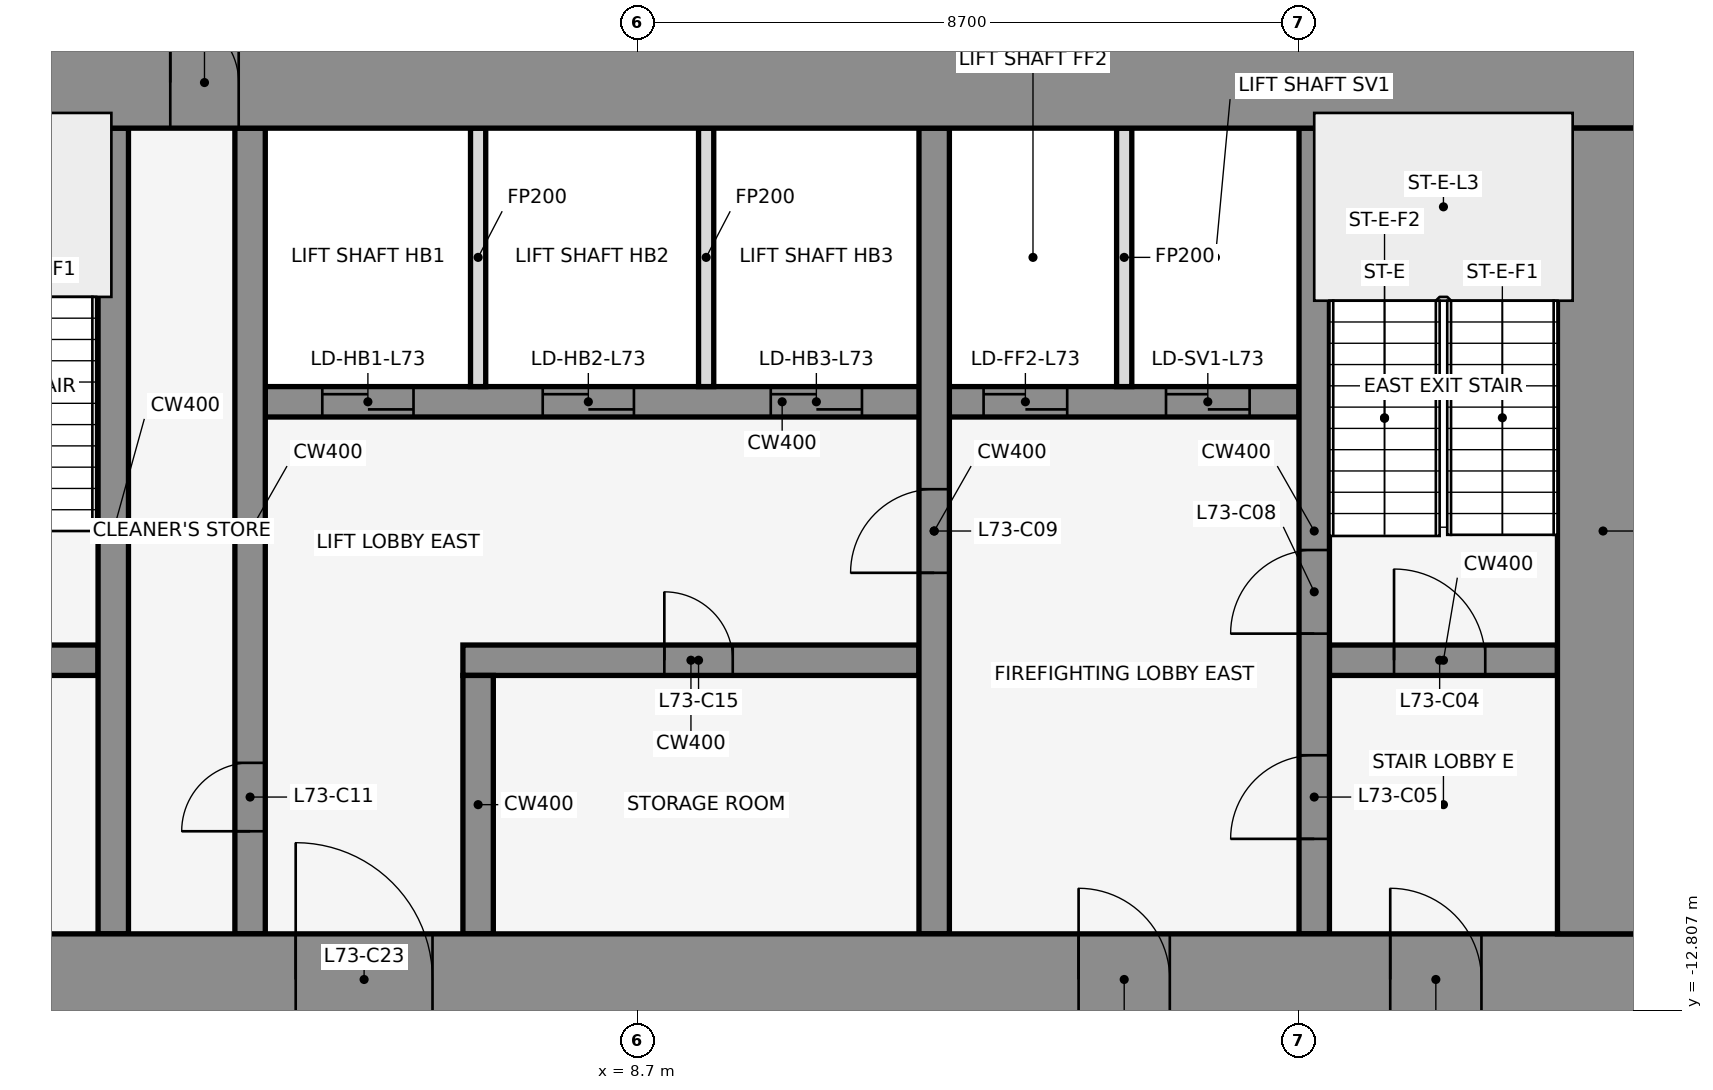
"""IFC4 building model, lengths in metres.
Left out: names, types, materials, properties, quantities, classifications, styles, units other than length and angle.
Written with IfcOpenShell. Run it as: python <this file> out.ifc"""

import sys

from ifc_helpers import new_model, si_unit, direction, frame, frame_2d, origin, place, context, subcontext, project, spatial, rectangle, extrude, element, fill, save


model = new_model("IFC4")
c1 = context("Model", 3, precision=1e-05, world=origin(), true_north=direction((0.0, 1.0)))
c2 = subcontext(c1, "Body", "Model", "MODEL_VIEW")
j1 = project(units=[si_unit("LENGTHUNIT", "METRE"), si_unit("PLANEANGLEUNIT", "RADIAN")], contexts=[c1])
p1 = place(None, origin())
s1 = spatial("IfcSite", under=j1, at=p1, CompositionType="ELEMENT")
p2 = place(p1, origin())
s2 = spatial("IfcBuilding", under=s1, at=p2, CompositionType="ELEMENT")
p3 = place(p2, frame((0.0, 0.0, 324.5)))
s3 = spatial("IfcBuildingStorey", under=s2, at=p3, CompositionType="ELEMENT", Elevation=324.5)
for number, where, z_axis, x_axis in (
    (1, (16.432, -0.105, 0.0), (0.0, 0.0, 1.0), (-0.84, 0.543, 0.0)),
    (2, (1.901, 1.08, 0.0), (0.0, 0.0, 1.0), (-0.84, -0.543, 0.0)),
):
    element("IfcWall", number, at=place(p3, frame(where, z_axis=z_axis, x_axis=x_axis)), inside=s3, PredefinedType="STANDARD", context=c2, shape_type="SweptSolid", body=[
        extrude(rectangle(XDim=2.183, YDim=0.25, at=frame_2d((1.091, 0.0))), origin(), (0.0, 0.0, 1.0), 4.35),
    ])
p4 = place(p3, frame((-1.6, -8.2, 0.0), z_axis=(0.0, 0.0, 1.0), x_axis=(1.0, 0.0, 0.0)))
e3 = element("IfcWall", 3, at=p4, inside=s3, PredefinedType="SHEAR", context=c2, shape_type="SweptSolid", body=[
    extrude(rectangle(XDim=3.2, YDim=0.4, at=frame_2d((1.6, 0.0))), origin(), (0.0, 0.0, 1.0), 4.5),
])
p5 = place(p4, frame((1.05, 0.0, 0.0)))
e4 = element("IfcOpeningElement", 4, at=p5, cuts=e3, PredefinedType="OPENING", context=c2, shape_type="SweptSolid", body=[
    extrude(rectangle(XDim=1.2, YDim=2.1, at=frame_2d((0.6, 1.05))), frame((0.0, 0.212, 0.0), z_axis=(0.0, -1.0, 0.0), x_axis=(1.0, 0.0, 0.0)), (0.0, 0.0, 1.0), 0.424),
])
p6 = place(p3, frame((6.4, -8.2, 0.0), z_axis=(0.0, 0.0, 1.0), x_axis=(1.0, 0.0, 0.0)))
e5 = element("IfcWall", 5, at=p6, inside=s3, PredefinedType="SHEAR", context=c2, shape_type="SweptSolid", body=[
    extrude(rectangle(XDim=6.0, YDim=0.4, at=frame_2d((3.0, 0.0))), origin(), (0.0, 0.0, 1.0), 4.5),
])
p7 = place(p6, frame((2.65, 0.0, 0.0)))
e6 = element("IfcOpeningElement", 6, at=p7, cuts=e5, PredefinedType="OPENING", context=c2, shape_type="SweptSolid", body=[
    extrude(rectangle(XDim=0.9, YDim=2.1, at=frame_2d((0.45, 1.05))), frame((0.0, 0.212, 0.0), z_axis=(0.0, -1.0, 0.0), x_axis=(1.0, 0.0, 0.0)), (0.0, 0.0, 1.0), 0.424),
])
p8 = place(p3, frame((17.8, -8.2, 0.0), z_axis=(0.0, 0.0, 1.0), x_axis=(1.0, 0.0, 0.0)))
e7 = element("IfcWall", 7, at=p8, inside=s3, PredefinedType="SHEAR", context=c2, shape_type="SweptSolid", body=[
    extrude(rectangle(XDim=3.0, YDim=0.4, at=frame_2d((1.5, 0.0))), origin(), (0.0, 0.0, 1.0), 4.5),
])
p9 = place(p8, frame((0.85, 0.0, 0.0)))
e8 = element("IfcOpeningElement", 8, at=p9, cuts=e7, PredefinedType="OPENING", context=c2, shape_type="SweptSolid", body=[
    extrude(rectangle(XDim=1.2, YDim=2.1, at=frame_2d((0.6, 1.05))), frame((0.0, 0.212, 0.0), z_axis=(0.0, -1.0, 0.0), x_axis=(1.0, 0.0, 0.0)), (0.0, 0.0, 1.0), 0.424),
])
p10 = place(p3, frame((3.8, -4.8, 0.0), z_axis=(0.0, 0.0, 1.0), x_axis=(1.0, 0.0, 0.0)))
e9 = element("IfcWall", 9, at=p10, inside=s3, PredefinedType="SHEAR", context=c2, shape_type="SweptSolid", body=[
    extrude(rectangle(XDim=13.6, YDim=0.4, at=frame_2d((6.8, 0.0))), origin(), (0.0, 0.0, 1.0), 4.5),
])
p11 = place(p10, frame((0.75, 0.0, 0.0)))
e10 = element("IfcOpeningElement", 10, at=p11, cuts=e9, PredefinedType="OPENING", context=c2, shape_type="SweptSolid", body=[
    extrude(rectangle(XDim=1.2, YDim=2.1, at=frame_2d((0.6, 1.05))), frame((0.0, 0.212, 0.0), z_axis=(0.0, -1.0, 0.0), x_axis=(1.0, 0.0, 0.0)), (0.0, 0.0, 1.0), 0.424),
])
p12 = place(p10, frame((3.65, 0.0, 0.0)))
e11 = element("IfcOpeningElement", 11, at=p12, cuts=e9, PredefinedType="OPENING", context=c2, shape_type="SweptSolid", body=[
    extrude(rectangle(XDim=1.2, YDim=2.1, at=frame_2d((0.6, 1.05))), frame((0.0, 0.212, 0.0), z_axis=(0.0, -1.0, 0.0), x_axis=(1.0, 0.0, 0.0)), (0.0, 0.0, 1.0), 0.424),
])
p13 = place(p10, frame((6.65, 0.0, 0.0)))
e12 = element("IfcOpeningElement", 12, at=p13, cuts=e9, PredefinedType="OPENING", context=c2, shape_type="SweptSolid", body=[
    extrude(rectangle(XDim=1.2, YDim=2.1, at=frame_2d((0.6, 1.05))), frame((0.0, 0.212, 0.0), z_axis=(0.0, -1.0, 0.0), x_axis=(1.0, 0.0, 0.0)), (0.0, 0.0, 1.0), 0.424),
])
p14 = place(p10, frame((9.45, 0.0, 0.0)))
e13 = element("IfcOpeningElement", 13, at=p14, cuts=e9, PredefinedType="OPENING", context=c2, shape_type="SweptSolid", body=[
    extrude(rectangle(XDim=1.1, YDim=2.1, at=frame_2d((0.55, 1.05))), frame((0.0, 0.212, 0.0), z_axis=(0.0, -1.0, 0.0), x_axis=(1.0, 0.0, 0.0)), (0.0, 0.0, 1.0), 0.424),
])
p15 = place(p10, frame((11.85, 0.0, 0.0)))
e14 = element("IfcOpeningElement", 14, at=p15, cuts=e9, PredefinedType="OPENING", context=c2, shape_type="SweptSolid", body=[
    extrude(rectangle(XDim=1.1, YDim=2.1, at=frame_2d((0.55, 1.05))), frame((0.0, 0.212, 0.0), z_axis=(0.0, -1.0, 0.0), x_axis=(1.0, 0.0, 0.0)), (0.0, 0.0, 1.0), 0.424),
])
p16 = place(p3, frame((1.8, -11.8, 0.0), z_axis=(0.0, 0.0, 1.0), x_axis=(0.0, 1.0, 0.0)))
e15 = element("IfcWall", 15, at=p16, inside=s3, PredefinedType="SHEAR", context=c2, shape_type="SweptSolid", body=[
    extrude(rectangle(XDim=10.6, YDim=0.4, at=frame_2d((5.3, 0.0))), origin(), (0.0, 0.0, 1.0), 4.5),
])
p17 = place(p3, frame((3.6, -11.8, 0.0), z_axis=(0.0, 0.0, 1.0), x_axis=(0.0, 1.0, 0.0)))
e16 = element("IfcWall", 16, at=p17, inside=s3, PredefinedType="SHEAR", context=c2, shape_type="SweptSolid", body=[
    extrude(rectangle(XDim=10.6, YDim=0.4, at=frame_2d((5.3, 0.0))), origin(), (0.0, 0.0, 1.0), 4.5),
])
p18 = place(p17, frame((1.35, 0.0, 0.0)))
e17 = element("IfcOpeningElement", 17, at=p18, cuts=e16, PredefinedType="OPENING", context=c2, shape_type="SweptSolid", body=[
    extrude(rectangle(XDim=0.9, YDim=2.1, at=frame_2d((0.45, 1.05))), frame((0.0, 0.212, 0.0), z_axis=(0.0, -1.0, 0.0), x_axis=(1.0, 0.0, 0.0)), (0.0, 0.0, 1.0), 0.424),
])
p19 = place(p3, frame((6.6, -11.8, 0.0), z_axis=(0.0, 0.0, 1.0), x_axis=(0.0, 1.0, 0.0)))
e18 = element("IfcWall", 18, at=p19, inside=s3, PredefinedType="SHEAR", context=c2, shape_type="SweptSolid", body=[
    extrude(rectangle(XDim=3.4, YDim=0.4, at=frame_2d((1.7, 0.0))), origin(), (0.0, 0.0, 1.0), 4.5),
])
for number, where, z_axis, x_axis in (
    (19, (6.6, -4.6, 0.0), (0.0, 0.0, 1.0), (0.0, 1.0, 0.0)),
    (20, (9.6, -4.6, 0.0), (0.0, 0.0, 1.0), (0.0, 1.0, 0.0)),
):
    element("IfcWall", number, at=place(p3, frame(where, z_axis=z_axis, x_axis=x_axis)), inside=s3, PredefinedType="PARTITIONING", context=c2, shape_type="SweptSolid", body=[
        extrude(rectangle(XDim=3.4, YDim=0.2, at=frame_2d((1.7, 0.0))), origin(), (0.0, 0.0, 1.0), 3.418),
    ])
p20 = place(p3, frame((12.6, -11.8, 0.0), z_axis=(0.0, 0.0, 1.0), x_axis=(0.0, 1.0, 0.0)))
e21 = element("IfcWall", 21, at=p20, inside=s3, PredefinedType="SHEAR", context=c2, shape_type="SweptSolid", body=[
    extrude(rectangle(XDim=10.6, YDim=0.4, at=frame_2d((5.3, 0.0))), origin(), (0.0, 0.0, 1.0), 4.5),
])
p21 = place(p20, frame((4.75, 0.0, 0.0)))
e22 = element("IfcOpeningElement", 22, at=p21, cuts=e21, PredefinedType="OPENING", context=c2, shape_type="SweptSolid", body=[
    extrude(rectangle(XDim=1.1, YDim=2.1, at=frame_2d((0.55, 1.05))), frame((0.0, 0.212, 0.0), z_axis=(0.0, -1.0, 0.0), x_axis=(1.0, 0.0, 0.0)), (0.0, 0.0, 1.0), 0.424),
])
p22 = place(p3, frame((15.1, -4.6, 0.0), z_axis=(0.0, 0.0, 1.0), x_axis=(0.0, 1.0, 0.0)))
e23 = element("IfcWall", 23, at=p22, inside=s3, PredefinedType="PARTITIONING", context=c2, shape_type="SweptSolid", body=[
    extrude(rectangle(XDim=3.4, YDim=0.2, at=frame_2d((1.7, 0.0))), origin(), (0.0, 0.0, 1.0), 3.418),
])
p23 = place(p3, frame((17.6, -11.8, 0.0), z_axis=(0.0, 0.0, 1.0), x_axis=(0.0, 1.0, 0.0)))
e24 = element("IfcWall", 24, at=p23, inside=s3, PredefinedType="SHEAR", context=c2, shape_type="SweptSolid", body=[
    extrude(rectangle(XDim=10.6, YDim=0.4, at=frame_2d((5.3, 0.0))), origin(), (0.0, 0.0, 1.0), 4.5),
])
p24 = place(p23, frame((1.25, 0.0, 0.0)))
e25 = element("IfcOpeningElement", 25, at=p24, cuts=e24, PredefinedType="OPENING", context=c2, shape_type="SweptSolid", body=[
    extrude(rectangle(XDim=1.1, YDim=2.1, at=frame_2d((0.55, 1.05))), frame((0.0, 0.212, 0.0), z_axis=(0.0, -1.0, 0.0), x_axis=(1.0, 0.0, 0.0)), (0.0, 0.0, 1.0), 0.424),
])
p25 = place(p23, frame((3.95, 0.0, 0.0)))
e26 = element("IfcOpeningElement", 26, at=p25, cuts=e24, PredefinedType="OPENING", context=c2, shape_type="SweptSolid", body=[
    extrude(rectangle(XDim=1.1, YDim=2.1, at=frame_2d((0.55, 1.05))), frame((0.0, 0.212, 0.0), z_axis=(0.0, -1.0, 0.0), x_axis=(1.0, 0.0, 0.0)), (0.0, 0.0, 1.0), 0.424),
])
p26 = place(p3, frame((-22.0, -0.6, 0.0), z_axis=(0.0, 0.0, 1.0), x_axis=(1.0, 0.0, 0.0)))
e27 = element("IfcWall", 27, at=p26, inside=s3, PredefinedType="SHEAR", context=c2, shape_type="SweptSolid", body=[
    extrude(rectangle(XDim=44.0, YDim=1.2, at=frame_2d((22.0, 0.0))), origin(), (0.0, 0.0, 1.0), 4.5),
])
p27 = place(p26, frame((18.55, 0.0, 0.0)))
e28 = element("IfcOpeningElement", 28, at=p27, cuts=e27, PredefinedType="OPENING", context=c2, shape_type="SweptSolid", body=[
    extrude(rectangle(XDim=0.9, YDim=2.1, at=frame_2d((0.45, 1.05))), frame((0.0, 0.612, 0.0), z_axis=(0.0, -1.0, 0.0), x_axis=(1.0, 0.0, 0.0)), (0.0, 0.0, 1.0), 1.224),
])
p28 = place(p26, frame((24.55, 0.0, 0.0)))
e29 = element("IfcOpeningElement", 29, at=p28, cuts=e27, PredefinedType="OPENING", context=c2, shape_type="SweptSolid", body=[
    extrude(rectangle(XDim=0.9, YDim=2.1, at=frame_2d((0.45, 1.05))), frame((0.0, 0.612, 0.0), z_axis=(0.0, -1.0, 0.0), x_axis=(1.0, 0.0, 0.0)), (0.0, 0.0, 1.0), 1.224),
])
p29 = place(p3, frame((-22.0, -12.4, 0.0), z_axis=(0.0, 0.0, 1.0), x_axis=(1.0, 0.0, 0.0)))
e30 = element("IfcWall", 30, at=p29, inside=s3, PredefinedType="SHEAR", context=c2, shape_type="SweptSolid", body=[
    extrude(rectangle(XDim=44.0, YDim=1.2, at=frame_2d((22.0, 0.0))), origin(), (0.0, 0.0, 1.0), 4.5),
])
p30 = place(p29, frame((2.2, 0.0, 0.0)))
e31 = element("IfcOpeningElement", 31, at=p30, cuts=e30, PredefinedType="OPENING", context=c2, shape_type="SweptSolid", body=[
    extrude(rectangle(XDim=1.2, YDim=2.1, at=frame_2d((0.6, 1.05))), frame((0.0, 0.612, 0.0), z_axis=(0.0, -1.0, 0.0), x_axis=(1.0, 0.0, 0.0)), (0.0, 0.0, 1.0), 1.224),
])
p31 = place(p29, frame((21.4, 0.0, 0.0)))
e32 = element("IfcOpeningElement", 32, at=p31, cuts=e30, PredefinedType="OPENING", context=c2, shape_type="SweptSolid", body=[
    extrude(rectangle(XDim=1.2, YDim=2.1, at=frame_2d((0.6, 1.05))), frame((0.0, 0.612, 0.0), z_axis=(0.0, -1.0, 0.0), x_axis=(1.0, 0.0, 0.0)), (0.0, 0.0, 1.0), 1.224),
])
p32 = place(p29, frame((40.6, 0.0, 0.0)))
e33 = element("IfcOpeningElement", 33, at=p32, cuts=e30, PredefinedType="OPENING", context=c2, shape_type="SweptSolid", body=[
    extrude(rectangle(XDim=1.2, YDim=2.1, at=frame_2d((0.6, 1.05))), frame((0.0, 0.612, 0.0), z_axis=(0.0, -1.0, 0.0), x_axis=(1.0, 0.0, 0.0)), (0.0, 0.0, 1.0), 1.224),
])
p33 = place(p29, frame((16.0, 0.0, 0.0)))
e34 = element("IfcOpeningElement", 34, at=p33, cuts=e30, PredefinedType="OPENING", context=c2, shape_type="SweptSolid", body=[
    extrude(rectangle(XDim=1.8, YDim=2.1, at=frame_2d((0.9, 1.05))), frame((0.0, 0.612, 0.0), z_axis=(0.0, -1.0, 0.0), x_axis=(1.0, 0.0, 0.0)), (0.0, 0.0, 1.0), 1.224),
])
p34 = place(p29, frame((6.3, 0.0, 0.0)))
e35 = element("IfcOpeningElement", 35, at=p34, cuts=e30, PredefinedType="OPENING", context=c2, shape_type="SweptSolid", body=[
    extrude(rectangle(XDim=1.2, YDim=2.1, at=frame_2d((0.6, 1.05))), frame((0.0, 0.612, 0.0), z_axis=(0.0, -1.0, 0.0), x_axis=(1.0, 0.0, 0.0)), (0.0, 0.0, 1.0), 1.224),
])
p35 = place(p29, frame((26.2, 0.0, 0.0)))
e36 = element("IfcOpeningElement", 36, at=p35, cuts=e30, PredefinedType="OPENING", context=c2, shape_type="SweptSolid", body=[
    extrude(rectangle(XDim=1.8, YDim=2.1, at=frame_2d((0.9, 1.05))), frame((0.0, 0.612, 0.0), z_axis=(0.0, -1.0, 0.0), x_axis=(1.0, 0.0, 0.0)), (0.0, 0.0, 1.0), 1.224),
])
p36 = place(p29, frame((36.5, 0.0, 0.0)))
e37 = element("IfcOpeningElement", 37, at=p36, cuts=e30, PredefinedType="OPENING", context=c2, shape_type="SweptSolid", body=[
    extrude(rectangle(XDim=1.2, YDim=2.1, at=frame_2d((0.6, 1.05))), frame((0.0, 0.612, 0.0), z_axis=(0.0, -1.0, 0.0), x_axis=(1.0, 0.0, 0.0)), (0.0, 0.0, 1.0), 1.224),
])
p37 = place(p3, frame((21.4, -11.8, 0.0), z_axis=(0.0, 0.0, 1.0), x_axis=(0.0, 1.0, 0.0)))
e38 = element("IfcWall", 38, at=p37, inside=s3, PredefinedType="SHEAR", context=c2, shape_type="SweptSolid", body=[
    extrude(rectangle(XDim=10.6, YDim=1.2, at=frame_2d((5.3, 0.0))), origin(), (0.0, 0.0, 1.0), 4.5),
])
p38 = place(p9, origin())
e39 = element("IfcDoor", 39, at=p38, inside=s3, OperationType="SINGLE_SWING_RIGHT", PredefinedType="DOOR", context=c2, shape_type="SweptSolid", body=[
    extrude(rectangle(XDim=1.2, YDim=2.1, at=frame_2d((0.6, 1.05))), frame((0.0, 0.025, 0.0), z_axis=(0.0, -1.0, 0.0), x_axis=(1.0, 0.0, 0.0)), (0.0, 0.0, 1.0), 0.05),
])
fill(e8, e39)
p39 = place(p24, origin())
e40 = element("IfcDoor", 40, at=p39, inside=s3, OperationType="SINGLE_SWING_LEFT", PredefinedType="DOOR", context=c2, shape_type="SweptSolid", body=[
    extrude(rectangle(XDim=1.1, YDim=2.1, at=frame_2d((0.55, 1.05))), frame((0.0, 0.025, 0.0), z_axis=(0.0, -1.0, 0.0), x_axis=(1.0, 0.0, 0.0)), (0.0, 0.0, 1.0), 0.05),
])
fill(e25, e40)
p40 = place(p11, origin())
e41 = element("IfcDoor", 41, at=p40, inside=s3, OperationType="DOUBLE_DOOR_SLIDING", PredefinedType="DOOR", context=c2, shape_type="SweptSolid", body=[
    extrude(rectangle(XDim=1.2, YDim=2.1, at=frame_2d((0.6, 1.05))), frame((0.0, 0.025, 0.0), z_axis=(0.0, -1.0, 0.0), x_axis=(1.0, 0.0, 0.0)), (0.0, 0.0, 1.0), 0.05),
])
fill(e10, e41)
p41 = place(p12, origin())
e42 = element("IfcDoor", 42, at=p41, inside=s3, OperationType="DOUBLE_DOOR_SLIDING", PredefinedType="DOOR", context=c2, shape_type="SweptSolid", body=[
    extrude(rectangle(XDim=1.2, YDim=2.1, at=frame_2d((0.6, 1.05))), frame((0.0, 0.025, 0.0), z_axis=(0.0, -1.0, 0.0), x_axis=(1.0, 0.0, 0.0)), (0.0, 0.0, 1.0), 0.05),
])
fill(e11, e42)
p42 = place(p13, origin())
e43 = element("IfcDoor", 43, at=p42, inside=s3, OperationType="DOUBLE_DOOR_SLIDING", PredefinedType="DOOR", context=c2, shape_type="SweptSolid", body=[
    extrude(rectangle(XDim=1.2, YDim=2.1, at=frame_2d((0.6, 1.05))), frame((0.0, 0.025, 0.0), z_axis=(0.0, -1.0, 0.0), x_axis=(1.0, 0.0, 0.0)), (0.0, 0.0, 1.0), 0.05),
])
fill(e12, e43)
p43 = place(p14, origin())
e44 = element("IfcDoor", 44, at=p43, inside=s3, OperationType="DOUBLE_DOOR_SLIDING", PredefinedType="DOOR", context=c2, shape_type="SweptSolid", body=[
    extrude(rectangle(XDim=1.1, YDim=2.1, at=frame_2d((0.55, 1.05))), frame((0.0, 0.025, 0.0), z_axis=(0.0, -1.0, 0.0), x_axis=(1.0, 0.0, 0.0)), (0.0, 0.0, 1.0), 0.05),
])
fill(e13, e44)
p44 = place(p15, origin())
e45 = element("IfcDoor", 45, at=p44, inside=s3, OperationType="DOUBLE_DOOR_SLIDING", PredefinedType="DOOR", context=c2, shape_type="SweptSolid", body=[
    extrude(rectangle(XDim=1.1, YDim=2.1, at=frame_2d((0.55, 1.05))), frame((0.0, 0.025, 0.0), z_axis=(0.0, -1.0, 0.0), x_axis=(1.0, 0.0, 0.0)), (0.0, 0.0, 1.0), 0.05),
])
fill(e14, e45)
p45 = place(p25, origin())
e46 = element("IfcDoor", 46, at=p45, inside=s3, OperationType="SINGLE_SWING_RIGHT", PredefinedType="DOOR", context=c2, shape_type="SweptSolid", body=[
    extrude(rectangle(XDim=1.1, YDim=2.1, at=frame_2d((0.55, 1.05))), frame((0.0, 0.025, 0.0), z_axis=(0.0, -1.0, 0.0), x_axis=(1.0, 0.0, 0.0)), (0.0, 0.0, 1.0), 0.05),
])
fill(e26, e46)
p46 = place(p21, frame((1.1, 0.0, 0.0), z_axis=(0.0, 0.0, 1.0), x_axis=(-1.0, 0.0, 0.0)))
e47 = element("IfcDoor", 47, at=p46, inside=s3, OperationType="SINGLE_SWING_RIGHT", PredefinedType="DOOR", context=c2, shape_type="SweptSolid", body=[
    extrude(rectangle(XDim=1.1, YDim=2.1, at=frame_2d((0.55, 1.05))), frame((0.0, 0.025, 0.0), z_axis=(0.0, -1.0, 0.0), x_axis=(1.0, 0.0, 0.0)), (0.0, 0.0, 1.0), 0.05),
])
fill(e22, e47)
p47 = place(p18, origin())
e48 = element("IfcDoor", 48, at=p47, inside=s3, OperationType="SINGLE_SWING_LEFT", PredefinedType="DOOR", context=c2, shape_type="SweptSolid", body=[
    extrude(rectangle(XDim=0.9, YDim=2.1, at=frame_2d((0.45, 1.05))), frame((0.0, 0.025, 0.0), z_axis=(0.0, -1.0, 0.0), x_axis=(1.0, 0.0, 0.0)), (0.0, 0.0, 1.0), 0.05),
])
fill(e17, e48)
p48 = place(p7, frame((0.9, 0.0, 0.0), z_axis=(0.0, 0.0, 1.0), x_axis=(-1.0, 0.0, 0.0)))
e49 = element("IfcDoor", 49, at=p48, inside=s3, OperationType="SINGLE_SWING_RIGHT", PredefinedType="DOOR", context=c2, shape_type="SweptSolid", body=[
    extrude(rectangle(XDim=0.9, YDim=2.1, at=frame_2d((0.45, 1.05))), frame((0.0, 0.025, 0.0), z_axis=(0.0, -1.0, 0.0), x_axis=(1.0, 0.0, 0.0)), (0.0, 0.0, 1.0), 0.05),
])
fill(e6, e49)
p49 = place(p28, origin())
e50 = element("IfcDoor", 50, at=p49, inside=s3, OperationType="SINGLE_SWING_LEFT", PredefinedType="DOOR", context=c2, shape_type="SweptSolid", body=[
    extrude(rectangle(XDim=0.9, YDim=2.1, at=frame_2d((0.45, 1.05))), frame((0.0, 0.025, 0.0), z_axis=(0.0, -1.0, 0.0), x_axis=(1.0, 0.0, 0.0)), (0.0, 0.0, 1.0), 0.05),
])
fill(e29, e50)
p50 = place(p32, frame((1.2, 0.0, 0.0), z_axis=(0.0, 0.0, 1.0), x_axis=(-1.0, 0.0, 0.0)))
e51 = element("IfcDoor", 51, at=p50, inside=s3, OperationType="SINGLE_SWING_RIGHT", PredefinedType="DOOR", context=c2, shape_type="SweptSolid", body=[
    extrude(rectangle(XDim=1.2, YDim=2.1, at=frame_2d((0.6, 1.05))), frame((0.0, 0.025, 0.0), z_axis=(0.0, -1.0, 0.0), x_axis=(1.0, 0.0, 0.0)), (0.0, 0.0, 1.0), 0.05),
])
fill(e33, e51)
p51 = place(p35, origin())
e52 = element("IfcDoor", 52, at=p51, inside=s3, OperationType="SINGLE_SWING_LEFT", PredefinedType="DOOR", context=c2, shape_type="SweptSolid", body=[
    extrude(rectangle(XDim=1.8, YDim=2.1, at=frame_2d((0.9, 1.05))), frame((0.0, 0.025, 0.0), z_axis=(0.0, -1.0, 0.0), x_axis=(1.0, 0.0, 0.0)), (0.0, 0.0, 1.0), 0.05),
])
fill(e36, e52)
p52 = place(p36, frame((1.2, 0.0, 0.0), z_axis=(0.0, 0.0, 1.0), x_axis=(-1.0, 0.0, 0.0)))
e53 = element("IfcDoor", 53, at=p52, inside=s3, OperationType="SINGLE_SWING_RIGHT", PredefinedType="DOOR", context=c2, shape_type="SweptSolid", body=[
    extrude(rectangle(XDim=1.2, YDim=2.1, at=frame_2d((0.6, 1.05))), frame((0.0, 0.025, 0.0), z_axis=(0.0, -1.0, 0.0), x_axis=(1.0, 0.0, 0.0)), (0.0, 0.0, 1.0), 0.05),
])
fill(e37, e53)
save(model, sys.argv[1])
